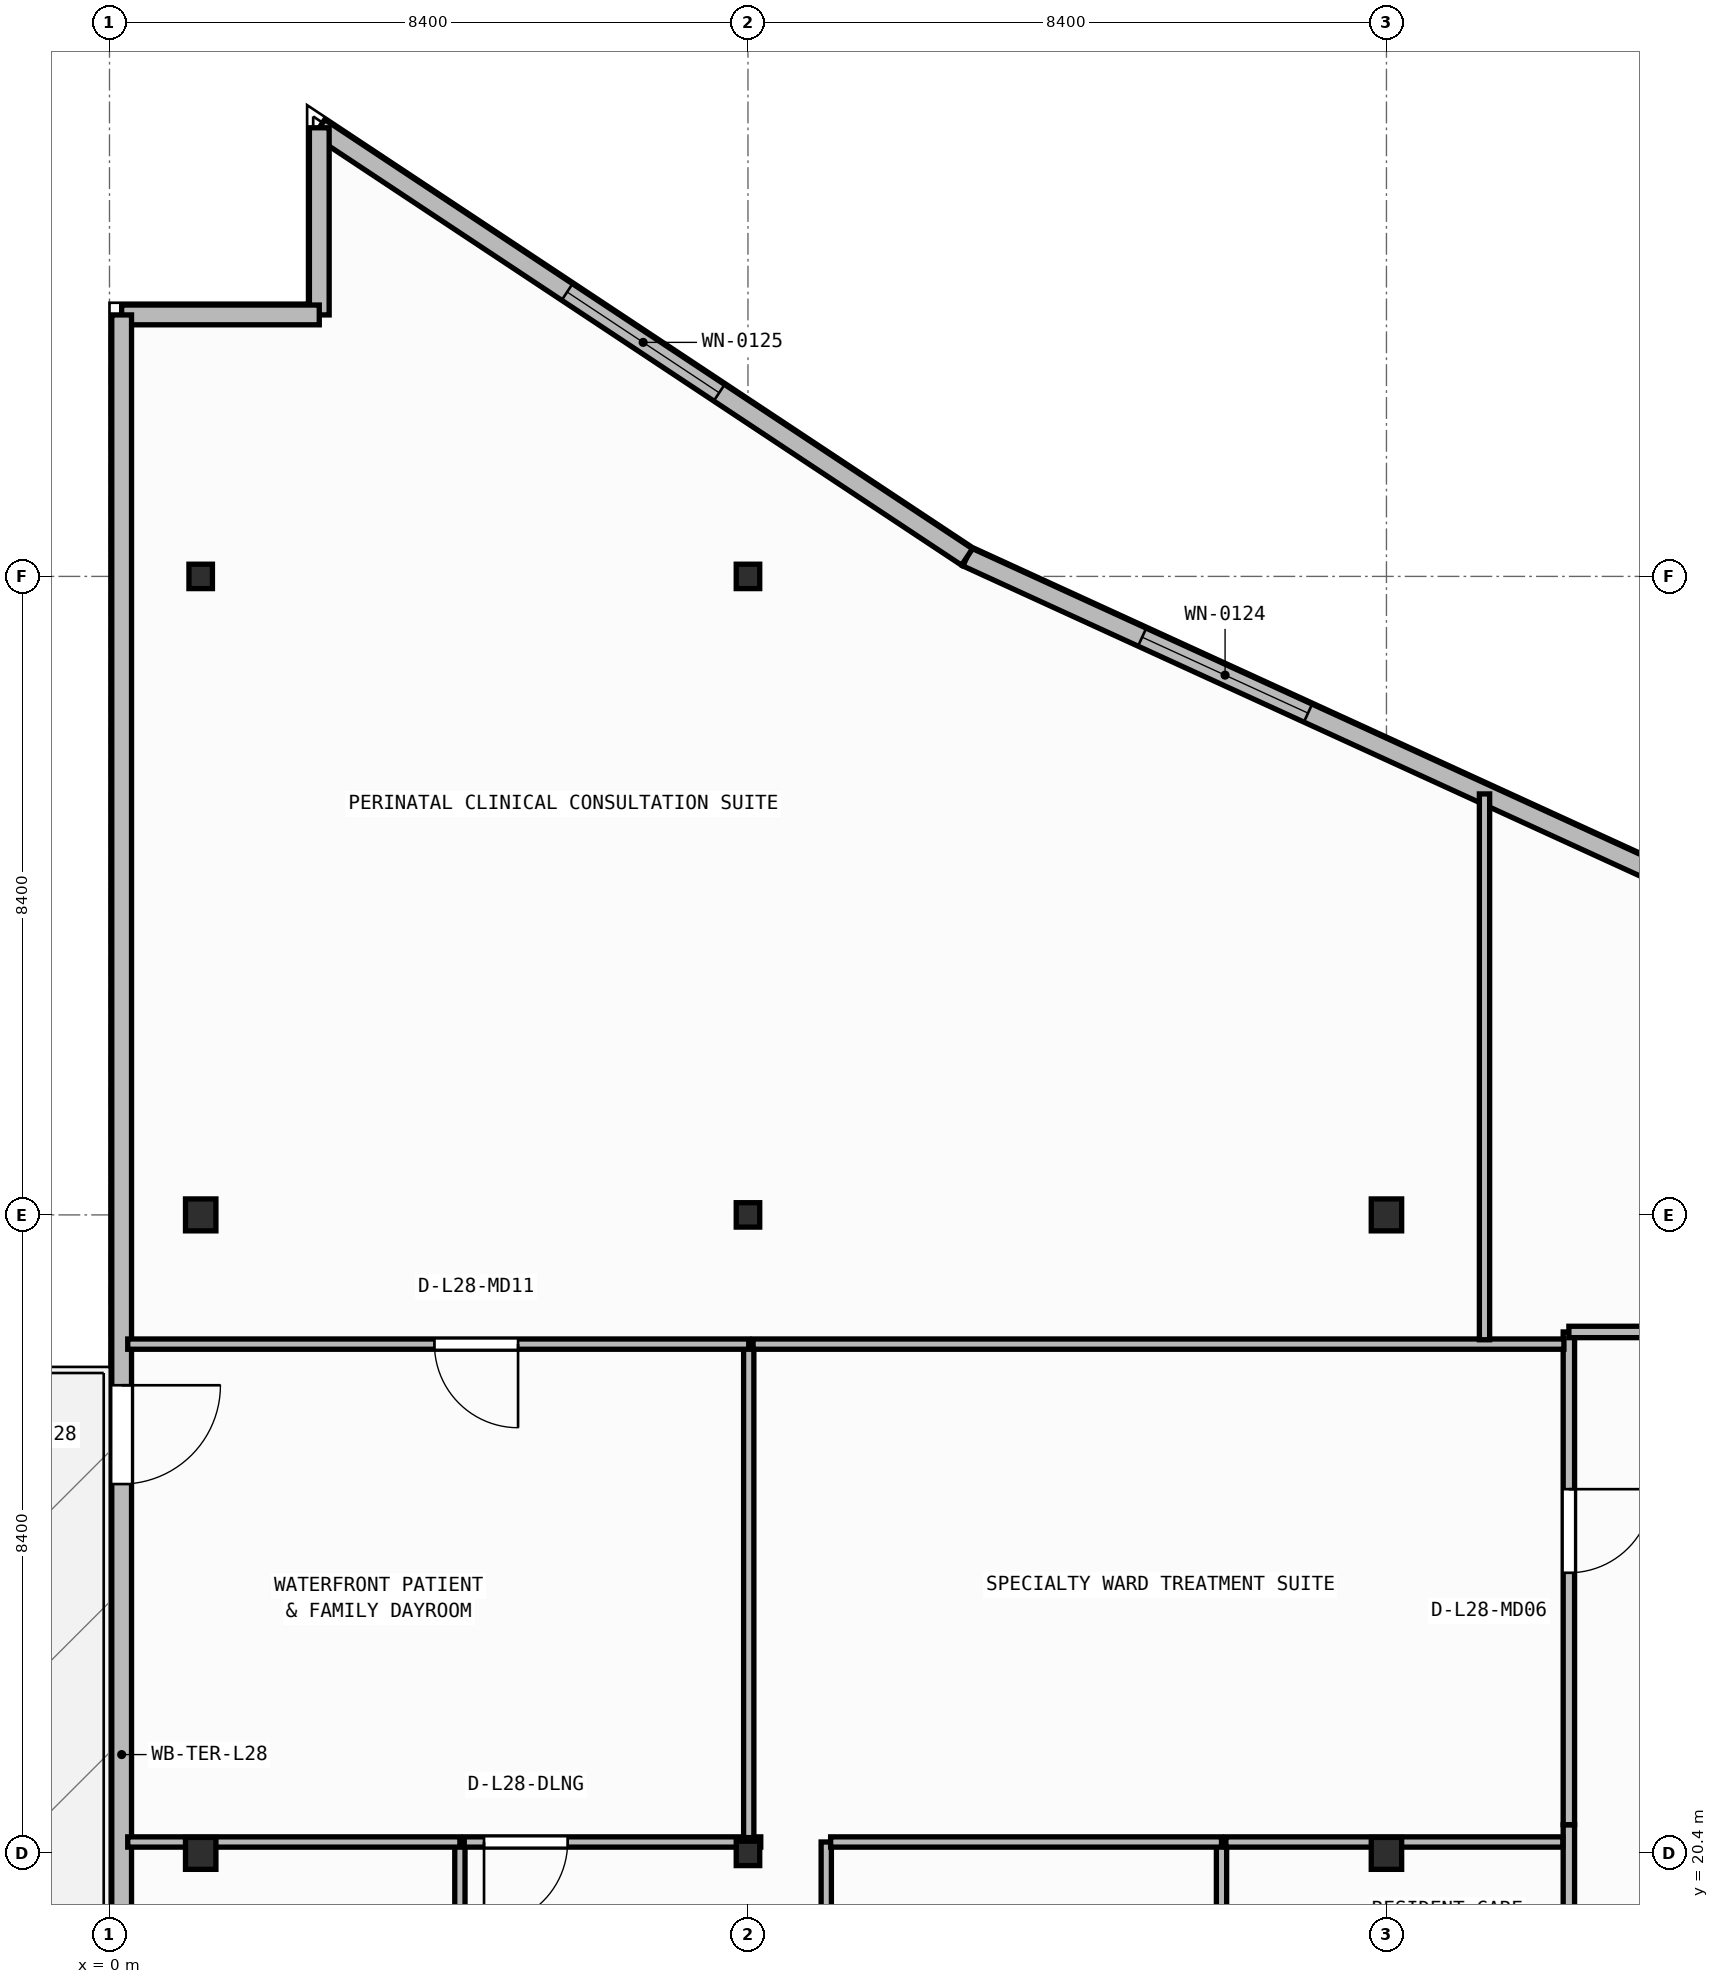
"""IFC4 building model, lengths in metres.
Left out: names, types, materials, properties, quantities, classifications, styles, units other than length and angle.
Written with IfcOpenShell. Run it as: python <this file> out.ifc"""

import sys

from ifc_helpers import new_model, si_unit, direction, frame, frame_2d, origin, origin_2d, place, context, subcontext, project, spatial, rectangle, i_section, extrude, element, fill, save


model = new_model("IFC4")
c1 = context("Model", 3, precision=1e-05, world=origin(), true_north=direction((0.0, 1.0)))
c2 = subcontext(c1, "Body", "Model", "MODEL_VIEW")
j1 = project(units=[si_unit("LENGTHUNIT", "METRE"), si_unit("PLANEANGLEUNIT", "RADIAN")], contexts=[c1])
p1 = place(None, origin())
s1 = spatial("IfcSite", under=j1, at=p1, CompositionType="ELEMENT")
p2 = place(p1, origin())
s2 = spatial("IfcBuilding", under=s1, at=p2, CompositionType="ELEMENT")
p3 = place(p2, frame((0.0, 0.0, 115.2)))
s3 = spatial("IfcBuildingStorey", under=s2, at=p3, CompositionType="ELEMENT", Elevation=115.2)
p4 = place(p3, frame((1.2, 20.4, 0.0), z_axis=(0.0, 0.0, 1.0), x_axis=(1.0, 0.0, 0.0)))
e1 = element("IfcColumn", 1, at=p4, inside=s3, PredefinedType="COLUMN", context=c2, shape_type="SweptSolid", body=[
    extrude(i_section(OverallWidth=0.4, OverallDepth=0.42, WebThickness=0.025, FlangeThickness=0.04, at=origin_2d()), origin(), (0.0, 0.0, 1.0), 3.95),
])
p5 = place(p3, frame((8.4, 20.4, 0.0), z_axis=(0.0, 0.0, 1.0), x_axis=(1.0, 0.0, 0.0)))
e2 = element("IfcColumn", 2, at=p5, inside=s3, PredefinedType="COLUMN", context=c2, shape_type="SweptSolid", body=[
    extrude(i_section(OverallWidth=0.309, OverallDepth=0.321, WebThickness=0.014, FlangeThickness=0.022, FilletRadius=0.017, at=origin_2d()), origin(), (0.0, 0.0, 1.0), 3.95),
])
for number, where, z_axis, x_axis in (
    (3, (16.8, 20.4, 0.0), (0.0, 0.0, 1.0), (1.0, 0.0, 0.0)),
    (4, (1.2, 28.8, 0.0), (0.0, 0.0, 1.0), (1.0, 0.0, 0.0)),
):
    element("IfcColumn", number, at=place(p3, frame(where, z_axis=z_axis, x_axis=x_axis)), inside=s3, PredefinedType="COLUMN", context=c2, shape_type="SweptSolid", body=[
        extrude(i_section(OverallWidth=0.4, OverallDepth=0.42, WebThickness=0.025, FlangeThickness=0.04, at=origin_2d()), origin(), (0.0, 0.0, 1.0), 3.95),
    ])
p6 = place(p3, frame((8.4, 28.8, 0.0), z_axis=(0.0, 0.0, 1.0), x_axis=(1.0, 0.0, 0.0)))
e5 = element("IfcColumn", 5, at=p6, inside=s3, PredefinedType="COLUMN", context=c2, shape_type="SweptSolid", body=[
    extrude(i_section(OverallWidth=0.309, OverallDepth=0.321, WebThickness=0.014, FlangeThickness=0.022, FilletRadius=0.017, at=origin_2d()), origin(), (0.0, 0.0, 1.0), 3.95),
])
p7 = place(p3, frame((16.8, 28.8, 0.0), z_axis=(0.0, 0.0, 1.0), x_axis=(1.0, 0.0, 0.0)))
e6 = element("IfcColumn", 6, at=p7, inside=s3, PredefinedType="COLUMN", context=c2, shape_type="SweptSolid", body=[
    extrude(i_section(OverallWidth=0.4, OverallDepth=0.42, WebThickness=0.025, FlangeThickness=0.04, at=origin_2d()), origin(), (0.0, 0.0, 1.0), 3.95),
])
for number, where, z_axis, x_axis in (
    (7, (1.2, 37.2, 0.0), (0.0, 0.0, 1.0), (1.0, 0.0, 0.0)),
    (8, (8.4, 37.2, 0.0), (0.0, 0.0, 1.0), (1.0, 0.0, 0.0)),
):
    element("IfcColumn", number, at=place(p3, frame(where, z_axis=z_axis, x_axis=x_axis)), inside=s3, PredefinedType="COLUMN", context=c2, shape_type="SweptSolid", body=[
        extrude(i_section(OverallWidth=0.309, OverallDepth=0.321, WebThickness=0.014, FlangeThickness=0.022, FilletRadius=0.017, at=origin_2d()), origin(), (0.0, 0.0, 1.0), 3.95),
    ])
p8 = place(p3, frame((23.818, 31.716, 0.0), z_axis=(0.0, 0.0, 1.0), x_axis=(-0.909209527513, 0.416338846471, 0.0)))
e9 = element("IfcWall", 9, at=p8, inside=s3, PredefinedType="STANDARD", context=c2, shape_type="SweptSolid", body=[
    extrude(rectangle(XDim=13.787, YDim=0.26, at=frame_2d((6.894, 0.0))), origin(), (0.0, 0.0, 1.0), 3.71),
])
p9 = place(p8, frame((8.854, 0.0, 0.9)))
e10 = element("IfcOpeningElement", 10, at=p9, cuts=e9, PredefinedType="OPENING", context=c2, shape_type="SweptSolid", body=[
    extrude(rectangle(XDim=2.4, YDim=1.65, at=frame_2d((1.2, 0.825))), frame((0.0, 0.14, 0.0), z_axis=(0.0, -1.0, 0.0), x_axis=(1.0, 0.0, 0.0)), (0.0, 0.0, 1.0), 0.28),
])
p10 = place(p3, frame((11.282, 37.456, 0.0), z_axis=(0.0, 0.0, 1.0), x_axis=(-0.833630474253, 0.552322580017, 0.0)))
e11 = element("IfcWall", 11, at=p10, inside=s3, PredefinedType="STANDARD", context=c2, shape_type="SweptSolid", body=[
    extrude(rectangle(XDim=10.223, YDim=0.26, at=frame_2d((5.111, 0.0))), origin(), (0.0, 0.0, 1.0), 3.71),
])
p11 = place(p10, frame((3.911, 0.0, 0.9)))
e12 = element("IfcOpeningElement", 12, at=p11, cuts=e11, PredefinedType="OPENING", context=c2, shape_type="SweptSolid", body=[
    extrude(rectangle(XDim=2.4, YDim=1.65, at=frame_2d((1.2, 0.825))), frame((0.0, 0.14, 0.0), z_axis=(0.0, -1.0, 0.0), x_axis=(1.0, 0.0, 0.0)), (0.0, 0.0, 1.0), 0.28),
])
p12 = place(p3, frame((2.76, 43.102, 0.0), z_axis=(0.0, 0.0, 1.0), x_axis=(0.0, -1.0, 0.0)))
e13 = element("IfcWall", 13, at=p12, inside=s3, PredefinedType="STANDARD", context=c2, shape_type="SweptSolid", body=[
    extrude(rectangle(XDim=2.462, YDim=0.26, at=frame_2d((1.231, 0.0))), origin(), (0.0, 0.0, 1.0), 3.71),
])
p13 = place(p3, frame((2.76, 40.64, 0.0), z_axis=(0.0, 0.0, 1.0), x_axis=(-1.0, 0.0, 0.0)))
e14 = element("IfcWall", 14, at=p13, inside=s3, PredefinedType="STANDARD", context=c2, shape_type="SweptSolid", body=[
    extrude(rectangle(XDim=2.6, YDim=0.26, at=frame_2d((1.3, 0.0))), origin(), (0.0, 0.0, 1.0), 3.71),
])
p14 = place(p3, frame((0.16, 40.64, 0.0), z_axis=(0.0, 0.0, 1.0), x_axis=(0.0, -1.0, 0.0)))
e15 = element("IfcWall", 15, at=p14, inside=s3, PredefinedType="STANDARD", context=c2, shape_type="SweptSolid", body=[
    extrude(rectangle(XDim=37.88, YDim=0.26, at=frame_2d((18.94, 0.0))), origin(), (0.0, 0.0, 1.0), 3.71),
])
p15 = place(p14, frame((14.081, 0.0, 0.0)))
e16 = element("IfcOpeningElement", 16, at=p15, cuts=e15, PredefinedType="OPENING", context=c2, shape_type="SweptSolid", body=[
    extrude(rectangle(XDim=1.3, YDim=2.15, at=frame_2d((0.65, 1.075))), frame((0.0, 0.14, 0.0), z_axis=(0.0, -1.0, 0.0), x_axis=(1.0, 0.0, 0.0)), (0.0, 0.0, 1.0), 0.28),
])
p16 = place(p14, frame((21.856, 0.0, 0.9)))
e17 = element("IfcOpeningElement", 17, at=p16, cuts=e15, PredefinedType="OPENING", context=c2, shape_type="SweptSolid", body=[
    extrude(rectangle(XDim=2.4, YDim=1.65, at=frame_2d((1.2, 0.825))), frame((0.0, 0.14, 0.0), z_axis=(0.0, -1.0, 0.0), x_axis=(1.0, 0.0, 0.0)), (0.0, 0.0, 1.0), 0.28),
])
p17 = place(p3, frame((19.2, 20.776, 0.0), z_axis=(0.0, 0.0, 1.0), x_axis=(0.0, -1.0, 0.0)))
e18 = element("IfcWall", 18, at=p17, inside=s3, PredefinedType="PARTITIONING", context=c2, shape_type="SweptSolid", body=[
    extrude(rectangle(XDim=6.076, YDim=0.15, at=frame_2d((3.038, 0.0))), origin(), (0.0, 0.0, 1.0), 3.71),
])
p18 = place(p3, frame((19.2, 27.26, 0.0), z_axis=(0.0, 0.0, 1.0), x_axis=(0.0, -1.0, 0.0)))
e19 = element("IfcWall", 19, at=p18, inside=s3, PredefinedType="PARTITIONING", context=c2, shape_type="SweptSolid", body=[
    extrude(rectangle(XDim=6.482, YDim=0.15, at=frame_2d((3.241, 0.0))), origin(), (0.0, 0.0, 1.0), 3.71),
])
p19 = place(p18, frame((2.068, 0.0, 0.0)))
e20 = element("IfcOpeningElement", 20, at=p19, cuts=e19, PredefinedType="OPENING", context=c2, shape_type="SweptSolid", body=[
    extrude(rectangle(XDim=1.1, YDim=2.1, at=frame_2d((0.55, 1.05))), frame((0.0, 0.085, 0.0), z_axis=(0.0, -1.0, 0.0), x_axis=(1.0, 0.0, 0.0)), (0.0, 0.0, 1.0), 0.17),
])
p20 = place(p3, frame((21.7, 27.26, 0.0), z_axis=(0.0, 0.0, 1.0), x_axis=(-1.0, 0.0, 0.0)))
e21 = element("IfcWall", 21, at=p20, inside=s3, PredefinedType="PARTITIONING", context=c2, shape_type="SweptSolid", body=[
    extrude(rectangle(XDim=2.5, YDim=0.15, at=frame_2d((1.25, 0.0))), origin(), (0.0, 0.0, 1.0), 3.71),
])
p21 = place(p20, frame((0.225, 0.0, 0.0)))
e22 = element("IfcOpeningElement", 22, at=p21, cuts=e21, PredefinedType="OPENING", context=c2, shape_type="SweptSolid", body=[
    extrude(rectangle(XDim=1.1, YDim=2.1, at=frame_2d((0.55, 1.05))), frame((0.0, 0.085, 0.0), z_axis=(0.0, -1.0, 0.0), x_axis=(1.0, 0.0, 0.0)), (0.0, 0.0, 1.0), 0.17),
])
p22 = place(p3, frame((4.61, 18.04, 0.0), z_axis=(0.0, 0.0, 1.0), x_axis=(0.0, 1.0, 0.0)))
e23 = element("IfcWall", 23, at=p22, inside=s3, PredefinedType="PARTITIONING", context=c2, shape_type="SweptSolid", body=[
    extrude(rectangle(XDim=2.51, YDim=0.135, at=frame_2d((1.255, 0.0))), origin(), (0.0, 0.0, 1.0), 3.71),
])
p23 = place(p3, frame((4.61, 20.55, 0.0), z_axis=(0.0, 0.0, 1.0), x_axis=(-1.0, 0.0, 0.0)))
e24 = element("IfcWall", 24, at=p23, inside=s3, PredefinedType="PARTITIONING", context=c2, shape_type="SweptSolid", body=[
    extrude(rectangle(XDim=4.37, YDim=0.135, at=frame_2d((2.185, 0.0))), origin(), (0.0, 0.0, 1.0), 3.083),
])
p24 = place(p3, frame((9.43, 17.833, 0.0), z_axis=(0.0, 0.0, 1.0), x_axis=(0.0, 1.0, 0.0)))
e25 = element("IfcWall", 25, at=p24, inside=s3, PredefinedType="PARTITIONING", context=c2, shape_type="SweptSolid", body=[
    extrude(rectangle(XDim=2.718, YDim=0.135, at=frame_2d((1.359, 0.0))), origin(), (0.0, 0.0, 1.0), 3.71),
])
p25 = place(p3, frame((8.568, 20.55, 0.0), z_axis=(0.0, 0.0, 1.0), x_axis=(-1.0, 0.0, 0.0)))
e26 = element("IfcWall", 26, at=p25, inside=s3, PredefinedType="PARTITIONING", context=c2, shape_type="SweptSolid", body=[
    extrude(rectangle(XDim=3.901, YDim=0.135, at=frame_2d((1.95, 0.0))), origin(), (0.0, 0.0, 1.0), 3.083),
])
p26 = place(p25, frame((2.541, 0.0, 0.0)))
e27 = element("IfcOpeningElement", 27, at=p26, cuts=e26, PredefinedType="OPENING", context=c2, shape_type="SweptSolid", body=[
    extrude(rectangle(XDim=1.1, YDim=2.1, at=frame_2d((0.55, 1.05))), frame((0.0, 0.077, 0.0), z_axis=(0.0, -1.0, 0.0), x_axis=(1.0, 0.0, 0.0)), (0.0, 0.0, 1.0), 0.155),
])
p27 = place(p3, frame((14.63, 17.833, 0.0), z_axis=(0.0, 0.0, 1.0), x_axis=(0.0, 1.0, 0.0)))
e28 = element("IfcWall", 28, at=p27, inside=s3, PredefinedType="PARTITIONING", context=c2, shape_type="SweptSolid", body=[
    extrude(rectangle(XDim=2.718, YDim=0.135, at=frame_2d((1.359, 0.0))), origin(), (0.0, 0.0, 1.0), 3.71),
])
p28 = place(p3, frame((14.63, 20.55, 0.0), z_axis=(0.0, 0.0, 1.0), x_axis=(-1.0, 0.0, 0.0)))
e29 = element("IfcWall", 29, at=p28, inside=s3, PredefinedType="PARTITIONING", context=c2, shape_type="SweptSolid", body=[
    extrude(rectangle(XDim=5.142, YDim=0.135, at=frame_2d((2.571, 0.0))), origin(), (0.0, 0.0, 1.0), 3.083),
])
p29 = place(p3, frame((19.12, 20.55, 0.0), z_axis=(0.0, 0.0, 1.0), x_axis=(-1.0, 0.0, 0.0)))
e30 = element("IfcWall", 30, at=p29, inside=s3, PredefinedType="PARTITIONING", context=c2, shape_type="SweptSolid", body=[
    extrude(rectangle(XDim=4.433, YDim=0.135, at=frame_2d((2.216, 0.0))), origin(), (0.0, 0.0, 1.0), 3.083),
])
p30 = place(p3, frame((8.41, 20.607, 0.0), z_axis=(0.0, 0.0, 1.0), x_axis=(0.0, 1.0, 0.0)))
e31 = element("IfcWall", 31, at=p30, inside=s3, PredefinedType="PARTITIONING", context=c2, shape_type="SweptSolid", body=[
    extrude(rectangle(XDim=6.493, YDim=0.135, at=frame_2d((3.246, 0.0))), origin(), (0.0, 0.0, 1.0), 3.152),
])
p31 = place(p3, frame((8.41, 27.1, 0.0), z_axis=(0.0, 0.0, 1.0), x_axis=(-1.0, 0.0, 0.0)))
e32 = element("IfcWall", 32, at=p31, inside=s3, PredefinedType="PARTITIONING", context=c2, shape_type="SweptSolid", body=[
    extrude(rectangle(XDim=8.17, YDim=0.135, at=frame_2d((4.085, 0.0))), origin(), (0.0, 0.0, 1.0), 3.71),
])
p32 = place(p31, frame((3.035, 0.0, 0.0)))
e33 = element("IfcOpeningElement", 33, at=p32, cuts=e32, PredefinedType="OPENING", context=c2, shape_type="SweptSolid", body=[
    extrude(rectangle(XDim=1.1, YDim=2.1, at=frame_2d((0.55, 1.05))), frame((0.0, 0.077, 0.0), z_axis=(0.0, -1.0, 0.0), x_axis=(1.0, 0.0, 0.0)), (0.0, 0.0, 1.0), 0.155),
])
p33 = place(p3, frame((19.135, 27.1, 0.0), z_axis=(0.0, 0.0, 1.0), x_axis=(-1.0, 0.0, 0.0)))
e34 = element("IfcWall", 34, at=p33, inside=s3, PredefinedType="PARTITIONING", context=c2, shape_type="SweptSolid", body=[
    extrude(rectangle(XDim=10.667, YDim=0.135, at=frame_2d((5.334, 0.0))), origin(), (0.0, 0.0, 1.0), 3.71),
])
p34 = place(p3, frame((18.09, 27.157, 0.0), z_axis=(0.0, 0.0, 1.0), x_axis=(0.0, 1.0, 0.0)))
e35 = element("IfcWall", 35, at=p34, inside=s3, PredefinedType="PARTITIONING", context=c2, shape_type="SweptSolid", body=[
    extrude(rectangle(XDim=7.181, YDim=0.135, at=frame_2d((3.59, 0.0))), origin(), (0.0, 0.0, 1.0), 3.71),
])
p35 = place(p9, origin())
e36 = element("IfcWindow", 36, at=p35, inside=s3, PartitioningType="SINGLE_PANEL", PredefinedType="WINDOW", context=c2, shape_type="SweptSolid", body=[
    extrude(rectangle(XDim=2.4, YDim=1.65, at=frame_2d((1.2, 0.825))), frame((0.0, 0.03, 0.0), z_axis=(0.0, -1.0, 0.0), x_axis=(1.0, 0.0, 0.0)), (0.0, 0.0, 1.0), 0.06),
])
fill(e10, e36)
p36 = place(p11, origin())
e37 = element("IfcWindow", 37, at=p36, inside=s3, PartitioningType="SINGLE_PANEL", PredefinedType="WINDOW", context=c2, shape_type="SweptSolid", body=[
    extrude(rectangle(XDim=2.4, YDim=1.65, at=frame_2d((1.2, 0.825))), frame((0.0, 0.03, 0.0), z_axis=(0.0, -1.0, 0.0), x_axis=(1.0, 0.0, 0.0)), (0.0, 0.0, 1.0), 0.06),
])
fill(e12, e37)
p37 = place(p15, origin())
e38 = element("IfcDoor", 38, at=p37, inside=s3, OperationType="SINGLE_SWING_LEFT", PredefinedType="DOOR", context=c2, shape_type="SweptSolid", body=[
    extrude(rectangle(XDim=1.3, YDim=2.15, at=frame_2d((0.65, 1.075))), frame((0.0, 0.025, 0.0), z_axis=(0.0, -1.0, 0.0), x_axis=(1.0, 0.0, 0.0)), (0.0, 0.0, 1.0), 0.05),
])
fill(e16, e38)
p38 = place(p19, origin())
e39 = element("IfcDoor", 39, at=p38, inside=s3, OperationType="SINGLE_SWING_LEFT", PredefinedType="DOOR", context=c2, shape_type="SweptSolid", body=[
    extrude(rectangle(XDim=1.1, YDim=2.1, at=frame_2d((0.55, 1.05))), frame((0.0, 0.025, 0.0), z_axis=(0.0, -1.0, 0.0), x_axis=(1.0, 0.0, 0.0)), (0.0, 0.0, 1.0), 0.05),
])
fill(e20, e39)
p39 = place(p26, origin())
e40 = element("IfcDoor", 40, at=p39, inside=s3, OperationType="SINGLE_SWING_RIGHT", PredefinedType="DOOR", context=c2, shape_type="SweptSolid", body=[
    extrude(rectangle(XDim=1.1, YDim=2.1, at=frame_2d((0.55, 1.05))), frame((0.0, 0.025, 0.0), z_axis=(0.0, -1.0, 0.0), x_axis=(1.0, 0.0, 0.0)), (0.0, 0.0, 1.0), 0.05),
])
fill(e27, e40)
p40 = place(p32, origin())
e41 = element("IfcDoor", 41, at=p40, inside=s3, OperationType="SINGLE_SWING_LEFT", PredefinedType="DOOR", context=c2, shape_type="SweptSolid", body=[
    extrude(rectangle(XDim=1.1, YDim=2.1, at=frame_2d((0.55, 1.05))), frame((0.0, 0.025, 0.0), z_axis=(0.0, -1.0, 0.0), x_axis=(1.0, 0.0, 0.0)), (0.0, 0.0, 1.0), 0.05),
])
fill(e33, e41)
save(model, sys.argv[1])
